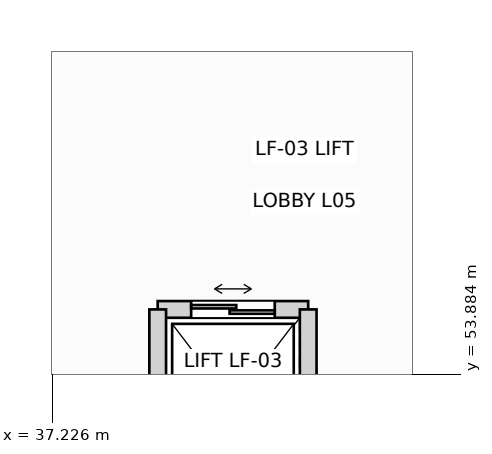
"""IFC4 building model, lengths in metres.
Left out: names, types, materials, properties, quantities, classifications, styles, units other than length and angle.
Written with IfcOpenShell. Run it as: python <this file> out.ifc"""

import sys

from ifc_helpers import new_model, si_unit, direction, frame, frame_2d, origin, place, context, subcontext, project, spatial, rectangle, extrude, element, fill, save


model = new_model("IFC4")
c1 = context("Model", 3, precision=1e-05, world=origin(), true_north=direction((0.0, 1.0)))
c2 = subcontext(c1, "Body", "Model", "MODEL_VIEW")
j1 = project(units=[si_unit("LENGTHUNIT", "METRE"), si_unit("PLANEANGLEUNIT", "RADIAN")], contexts=[c1])
p1 = place(None, origin())
s1 = spatial("IfcSite", under=j1, at=p1, CompositionType="ELEMENT")
p2 = place(p1, origin())
s2 = spatial("IfcBuilding", under=s1, at=p2, CompositionType="ELEMENT")
p3 = place(p2, frame((0.0, 0.0, 26.4)))
s3 = spatial("IfcBuildingStorey", under=s2, at=p3, CompositionType="ELEMENT", Elevation=26.4)
p4 = place(p3, frame((38.61, 54.74, 0.0), z_axis=(0.0, 0.0, 1.0), x_axis=(1.0, 0.0, 0.0)))
e1 = element("IfcWall", 1, at=p4, inside=s3, PredefinedType="PARTITIONING", context=c2, shape_type="SweptSolid", body=[
    extrude(rectangle(XDim=1.98, YDim=0.22, at=frame_2d((0.99, 0.0))), origin(), (0.0, 0.0, 1.0), 2.905),
])
p5 = place(p4, frame((0.44, 0.0, 0.0)))
e2 = element("IfcOpeningElement", 2, at=p5, cuts=e1, PredefinedType="OPENING", context=c2, shape_type="SweptSolid", body=[
    extrude(rectangle(XDim=1.1, YDim=2.18, at=frame_2d((0.55, 1.09))), frame((0.0, 0.12, 0.0), z_axis=(0.0, -1.0, 0.0), x_axis=(1.0, 0.0, 0.0)), (0.0, 0.0, 1.0), 0.24),
])
for number, where, z_axis, x_axis in (
    (3, (38.61, 52.26, 0.0), (0.0, 0.0, 1.0), (0.0, 1.0, 0.0)),
    (4, (40.59, 52.26, 0.0), (0.0, 0.0, 1.0), (0.0, 1.0, 0.0)),
):
    element("IfcWall", number, at=place(p3, frame(where, z_axis=z_axis, x_axis=x_axis)), inside=s3, PredefinedType="PARTITIONING", context=c2, shape_type="SweptSolid", body=[
        extrude(rectangle(XDim=2.48, YDim=0.22, at=frame_2d((1.24, 0.0))), origin(), (0.0, 0.0, 1.0), 2.905),
    ])
p6 = place(p5, origin())
e5 = element("IfcDoor", 5, at=p6, inside=s3, OperationType="DOUBLE_DOOR_SLIDING", PredefinedType="DOOR", context=c2, shape_type="SweptSolid", body=[
    extrude(rectangle(XDim=1.1, YDim=2.18, at=frame_2d((0.55, 1.09))), frame((0.0, 0.025, 0.0), z_axis=(0.0, -1.0, 0.0), x_axis=(1.0, 0.0, 0.0)), (0.0, 0.0, 1.0), 0.05),
])
fill(e2, e5)
save(model, sys.argv[1])
